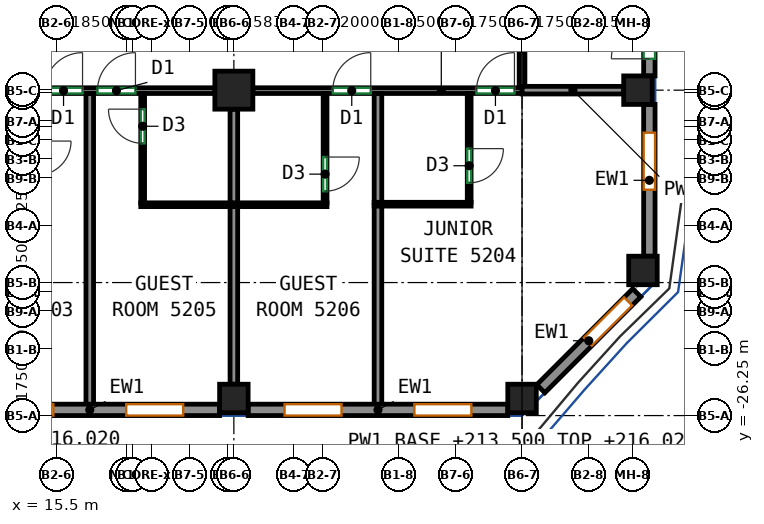
"""IFC4 building model, lengths in metres.
Left out: names, types, materials, properties, quantities, classifications, styles, units other than length and angle.
Written with IfcOpenShell. Run it as: python <this file> out.ifc"""

import sys

from ifc_helpers import new_model, si_unit, direction, frame, frame_2d, origin, origin_2d, place, context, subcontext, project, spatial, rectangle, extrude, source, transform, mapped, element, fill, save


model = new_model("IFC4")
c1 = context("Model", 3, precision=1e-05, world=origin(), true_north=direction((0.0, 1.0)))
c2 = subcontext(c1, "Body", "Model", "MODEL_VIEW")
j1 = project(units=[si_unit("LENGTHUNIT", "METRE"), si_unit("PLANEANGLEUNIT", "RADIAN")], contexts=[c1])
p1 = place(None, origin())
s1 = spatial("IfcSite", under=j1, at=p1, CompositionType="ELEMENT")
p2 = place(p1, origin())
s2 = spatial("IfcBuilding", under=s1, at=p2, CompositionType="ELEMENT")
p3 = place(p2, frame((0.0, 0.0, 213.5)))
s3 = spatial("IfcBuildingStorey", under=s2, at=p3, CompositionType="ELEMENT", Elevation=213.5)
m1 = source(origin(), c2, "Body", "SweptSolid", [
    extrude(rectangle(XDim=0.75, YDim=0.75, at=origin_2d()), origin(), (0.0, 0.0, 1.0), 3.12),
])
p4 = place(p3, frame((20.167, -25.8, 0.0), z_axis=(0.0, 0.0, 1.0), x_axis=(1.0, 0.0, 0.0)))
e1 = element("IfcColumn", 1, at=p4, inside=s3, PredefinedType="COLUMN", context=c2, shape_type="MappedRepresentation", body=[
    mapped(m1, transform((0.0, 0.0, 0.0))),
])
m2 = source(origin(), c2, "Body", "SweptSolid", [
    extrude(rectangle(XDim=1.0, YDim=1.0, at=origin_2d()), origin(), (0.0, 0.0, 1.0), 3.12),
])
p5 = place(p3, frame((20.167, -17.688, 0.0), z_axis=(0.0, 0.0, 1.0), x_axis=(1.0, 0.0, 0.0)))
e2 = element("IfcColumn", 2, at=p5, inside=s3, PredefinedType="COLUMN", context=c2, shape_type="MappedRepresentation", body=[
    mapped(m2, transform((0.0, 0.0, 0.0))),
])
for number, where, z_axis, x_axis in (
    (3, (27.75, -25.8, 0.0), (0.0, 0.0, 1.0), (1.0, 0.0, 0.0)),
    (4, (30.8, -17.688, 0.0), (0.0, 0.0, 1.0), (1.0, 0.0, 0.0)),
    (5, (30.932, -22.432, 0.0), (0.0, 0.0, 1.0), (1.0, 0.0, 0.0)),
):
    element("IfcColumn", number, at=place(p3, frame(where, z_axis=z_axis, x_axis=x_axis)), inside=s3, PredefinedType="COLUMN", context=c2, shape_type="MappedRepresentation", body=[
        mapped(m1, transform((0.0, 0.0, 0.0))),
    ])
m3 = source(origin(), c2, "Body", "SweptSolid", [
    extrude(rectangle(XDim=6.833, YDim=0.3, at=frame_2d((3.417, 0.0))), origin(), (0.0, 0.0, 1.0), 3.12),
])
p6 = place(p3, frame((12.958, -26.1, 0.0), z_axis=(0.0, 0.0, 1.0), x_axis=(1.0, 0.0, 0.0)))
e6 = element("IfcWall", 6, at=p6, inside=s3, PredefinedType="SOLIDWALL", context=c2, shape_type="MappedRepresentation", body=[
    mapped(m3, transform((0.0, 0.0, 0.0))),
])
p7 = place(p6, frame((0.958, 0.0, 0.85)))
e7 = element("IfcOpeningElement", 7, at=p7, cuts=e6, PredefinedType="OPENING", context=c2, shape_type="SweptSolid", body=[
    extrude(rectangle(XDim=1.5, YDim=1.95, at=frame_2d((0.75, 0.975))), frame((0.0, 0.16, 0.0), z_axis=(0.0, -1.0, 0.0), x_axis=(1.0, 0.0, 0.0)), (0.0, 0.0, 1.0), 0.32),
])
p8 = place(p6, frame((4.375, 0.0, 0.85)))
e8 = element("IfcOpeningElement", 8, at=p8, cuts=e6, PredefinedType="OPENING", context=c2, shape_type="SweptSolid", body=[
    extrude(rectangle(XDim=1.5, YDim=1.95, at=frame_2d((0.75, 0.975))), frame((0.0, 0.16, 0.0), z_axis=(0.0, -1.0, 0.0), x_axis=(1.0, 0.0, 0.0)), (0.0, 0.0, 1.0), 0.32),
])
m4 = source(origin(), c2, "Body", "SweptSolid", [
    extrude(rectangle(XDim=6.833, YDim=0.3, at=frame_2d((3.417, 0.0))), origin(), (0.0, 0.0, 1.0), 3.12),
])
p9 = place(p3, frame((20.542, -26.1, 0.0), z_axis=(0.0, 0.0, 1.0), x_axis=(1.0, 0.0, 0.0)))
e9 = element("IfcWall", 9, at=p9, inside=s3, PredefinedType="SOLIDWALL", context=c2, shape_type="MappedRepresentation", body=[
    mapped(m4, transform((0.0, 0.0, 0.0))),
])
p10 = place(p9, frame((0.958, 0.0, 0.85)))
e10 = element("IfcOpeningElement", 10, at=p10, cuts=e9, PredefinedType="OPENING", context=c2, shape_type="SweptSolid", body=[
    extrude(rectangle(XDim=1.5, YDim=1.95, at=frame_2d((0.75, 0.975))), frame((0.0, 0.16, 0.0), z_axis=(0.0, -1.0, 0.0), x_axis=(1.0, 0.0, 0.0)), (0.0, 0.0, 1.0), 0.32),
])
p11 = place(p9, frame((4.375, 0.0, 0.85)))
e11 = element("IfcOpeningElement", 11, at=p11, cuts=e9, PredefinedType="OPENING", context=c2, shape_type="SweptSolid", body=[
    extrude(rectangle(XDim=1.5, YDim=1.95, at=frame_2d((0.75, 0.975))), frame((0.0, 0.16, 0.0), z_axis=(0.0, -1.0, 0.0), x_axis=(1.0, 0.0, 0.0)), (0.0, 0.0, 1.0), 0.32),
])
m5 = source(origin(), c2, "Body", "SweptSolid", [
    extrude(rectangle(XDim=3.571, YDim=0.3, at=frame_2d((1.786, 0.0))), origin(), (0.0, 0.0, 1.0), 3.12),
])
p12 = place(p3, frame((28.244, -25.544, 0.0), z_axis=(0.0, 0.0, 1.0), x_axis=(0.707072595841, 0.707140964879, 0.0)))
e12 = element("IfcWall", 12, at=p12, inside=s3, PredefinedType="SOLIDWALL", context=c2, shape_type="MappedRepresentation", body=[
    mapped(m5, transform((0.0, 0.0, 0.0))),
])
p13 = place(p12, frame((1.75, 0.0, 0.85)))
e13 = element("IfcOpeningElement", 13, at=p13, cuts=e12, PredefinedType="OPENING", context=c2, shape_type="SweptSolid", body=[
    extrude(rectangle(XDim=1.5, YDim=1.95, at=frame_2d((0.75, 0.975))), frame((0.0, 0.16, 0.0), z_axis=(0.0, -1.0, 0.0), x_axis=(1.0, 0.0, 0.0)), (0.0, 0.0, 1.0), 0.32),
])
m6 = source(origin(), c2, "Body", "SweptSolid", [
    extrude(rectangle(XDim=3.994, YDim=0.3, at=frame_2d((1.997, 0.0))), origin(), (0.0, 0.0, 1.0), 3.12),
])
p14 = place(p3, frame((31.1, -22.057, 0.0), z_axis=(0.0, 0.0, 1.0), x_axis=(0.0, 1.0, 0.0)))
e14 = element("IfcWall", 14, at=p14, inside=s3, PredefinedType="SOLIDWALL", context=c2, shape_type="MappedRepresentation", body=[
    mapped(m6, transform((0.0, 0.0, 0.0))),
])
p15 = place(p14, frame((1.75, 0.0, 0.85)))
e15 = element("IfcOpeningElement", 15, at=p15, cuts=e14, PredefinedType="OPENING", context=c2, shape_type="SweptSolid", body=[
    extrude(rectangle(XDim=1.5, YDim=1.95, at=frame_2d((0.75, 0.975))), frame((0.0, 0.16, 0.0), z_axis=(0.0, -1.0, 0.0), x_axis=(1.0, 0.0, 0.0)), (0.0, 0.0, 1.0), 0.32),
])
m7 = source(origin(), c2, "Body", "SweptSolid", [
    extrude(rectangle(XDim=7.812, YDim=0.3, at=frame_2d((3.906, 0.0))), origin(), (0.0, 0.0, 1.0), 3.12),
])
p16 = place(p3, frame((31.1, -17.312, 0.0), z_axis=(0.0, 0.0, 1.0), x_axis=(0.0, 1.0, 0.0)))
e16 = element("IfcWall", 16, at=p16, inside=s3, PredefinedType="SOLIDWALL", context=c2, shape_type="MappedRepresentation", body=[
    mapped(m7, transform((0.0, 0.0, 0.0))),
])
p17 = place(p16, frame((1.75, 0.0, 0.85)))
e17 = element("IfcOpeningElement", 17, at=p17, cuts=e16, PredefinedType="OPENING", context=c2, shape_type="SweptSolid", body=[
    extrude(rectangle(XDim=1.5, YDim=1.95, at=frame_2d((0.75, 0.975))), frame((0.0, 0.16, 0.0), z_axis=(0.0, -1.0, 0.0), x_axis=(1.0, 0.0, 0.0)), (0.0, 0.0, 1.0), 0.32),
])
p18 = place(p16, frame((0.45, 0.0, 0.0)))
e18 = element("IfcOpeningElement", 18, at=p18, cuts=e16, PredefinedType="OPENING", context=c2, shape_type="SweptSolid", body=[
    extrude(rectangle(XDim=1.0, YDim=2.1, at=frame_2d((0.5, 1.05))), frame((0.0, 0.16, 0.0), z_axis=(0.0, -1.0, 0.0), x_axis=(1.0, 0.0, 0.0)), (0.0, 0.0, 1.0), 0.32),
])
p19 = place(p16, frame((5.656, 0.0, 0.85)))
e19 = element("IfcOpeningElement", 19, at=p19, cuts=e16, PredefinedType="OPENING", context=c2, shape_type="SweptSolid", body=[
    extrude(rectangle(XDim=1.5, YDim=1.95, at=frame_2d((0.75, 0.975))), frame((0.0, 0.16, 0.0), z_axis=(0.0, -1.0, 0.0), x_axis=(1.0, 0.0, 0.0)), (0.0, 0.0, 1.0), 0.32),
])
p20 = place(p16, frame((4.356, 0.0, 0.0)))
e20 = element("IfcOpeningElement", 20, at=p20, cuts=e16, PredefinedType="OPENING", context=c2, shape_type="SweptSolid", body=[
    extrude(rectangle(XDim=1.0, YDim=2.1, at=frame_2d((0.5, 1.05))), frame((0.0, 0.16, 0.0), z_axis=(0.0, -1.0, 0.0), x_axis=(1.0, 0.0, 0.0)), (0.0, 0.0, 1.0), 0.32),
])
p21 = place(p3, frame((13.083, -17.7, 0.0), z_axis=(0.0, 0.0, 1.0), x_axis=(1.0, 0.0, 0.0)))
e21 = element("IfcWall", 21, at=p21, inside=s3, PredefinedType="PARTITIONING", context=c2, shape_type="SweptSolid", body=[
    extrude(rectangle(XDim=6.584, YDim=0.15, at=frame_2d((3.292, 0.0))), origin(), (0.0, 0.0, 1.0), 3.12),
])
p22 = place(p21, frame((2.102, 0.0, 0.0)))
e22 = element("IfcOpeningElement", 22, at=p22, cuts=e21, PredefinedType="OPENING", context=c2, shape_type="SweptSolid", body=[
    extrude(rectangle(XDim=1.0, YDim=2.1, at=frame_2d((0.5, 1.05))), frame((0.0, 0.085, 0.0), z_axis=(0.0, -1.0, 0.0), x_axis=(1.0, 0.0, 0.0)), (0.0, 0.0, 1.0), 0.17),
])
p23 = place(p21, frame((3.494, 0.0, 0.0)))
e23 = element("IfcOpeningElement", 23, at=p23, cuts=e21, PredefinedType="OPENING", context=c2, shape_type="SweptSolid", body=[
    extrude(rectangle(XDim=1.0, YDim=2.1, at=frame_2d((0.5, 1.05))), frame((0.0, 0.085, 0.0), z_axis=(0.0, -1.0, 0.0), x_axis=(1.0, 0.0, 0.0)), (0.0, 0.0, 1.0), 0.17),
])
p24 = place(p3, frame((20.667, -17.7, 0.0), z_axis=(0.0, 0.0, 1.0), x_axis=(1.0, 0.0, 0.0)))
e24 = element("IfcWall", 24, at=p24, inside=s3, PredefinedType="PARTITIONING", context=c2, shape_type="SweptSolid", body=[
    extrude(rectangle(XDim=7.083, YDim=0.15, at=frame_2d((3.542, 0.0))), origin(), (0.0, 0.0, 1.0), 2.52),
])
p25 = place(p24, frame((2.102, 0.0, 0.0)))
e25 = element("IfcOpeningElement", 25, at=p25, cuts=e24, PredefinedType="OPENING", context=c2, shape_type="SweptSolid", body=[
    extrude(rectangle(XDim=1.0, YDim=2.1, at=frame_2d((0.5, 1.05))), frame((0.0, 0.085, 0.0), z_axis=(0.0, -1.0, 0.0), x_axis=(1.0, 0.0, 0.0)), (0.0, 0.0, 1.0), 0.17),
])
p26 = place(p24, frame((5.883, 0.0, 0.0)))
e26 = element("IfcOpeningElement", 26, at=p26, cuts=e24, PredefinedType="OPENING", context=c2, shape_type="SweptSolid", body=[
    extrude(rectangle(XDim=1.0, YDim=2.1, at=frame_2d((0.5, 1.05))), frame((0.0, 0.085, 0.0), z_axis=(0.0, -1.0, 0.0), x_axis=(1.0, 0.0, 0.0)), (0.0, 0.0, 1.0), 0.17),
])
p27 = place(p3, frame((27.75, -17.598, 0.0), z_axis=(0.0, 0.0, 1.0), x_axis=(0.0, 1.0, 0.0)))
e27 = element("IfcWall", 27, at=p27, inside=s3, PredefinedType="PARTITIONING", context=c2, shape_type="SweptSolid", body=[
    extrude(rectangle(XDim=2.023, YDim=0.15, at=frame_2d((1.011, 0.0))), origin(), (0.0, 0.0, 1.0), 2.52),
])
p28 = place(p3, frame((16.375, -26.0, 0.0), z_axis=(0.0, 0.0, 1.0), x_axis=(0.0, 1.0, 0.0)))
e28 = element("IfcWall", 28, at=p28, inside=s3, PredefinedType="PARTITIONING", context=c2, shape_type="SweptSolid", body=[
    extrude(rectangle(XDim=8.223, YDim=0.2, at=frame_2d((4.111, 0.0))), origin(), (0.0, 0.0, 1.0), 3.12),
])
p29 = place(p3, frame((17.767, -20.652, 0.0), z_axis=(0.0, 0.0, 1.0), x_axis=(0.0, 1.0, 0.0)))
e29 = element("IfcWall", 29, at=p29, inside=s3, PredefinedType="PARTITIONING", context=c2, shape_type="SweptSolid", body=[
    extrude(rectangle(XDim=2.875, YDim=0.1, at=frame_2d((1.438, 0.0))), origin(), (0.0, 0.0, 1.0), 3.12),
])
p30 = place(p29, frame((1.565, 0.0, 0.0)))
e30 = element("IfcOpeningElement", 30, at=p30, cuts=e29, PredefinedType="OPENING", context=c2, shape_type="SweptSolid", body=[
    extrude(rectangle(XDim=0.9, YDim=2.1, at=frame_2d((0.45, 1.05))), frame((0.0, 0.06, 0.0), z_axis=(0.0, -1.0, 0.0), x_axis=(1.0, 0.0, 0.0)), (0.0, 0.0, 1.0), 0.12),
])
p31 = place(p3, frame((17.717, -20.702, 0.0), z_axis=(0.0, 0.0, 1.0), x_axis=(1.0, 0.0, 0.0)))
e31 = element("IfcWall", 31, at=p31, inside=s3, PredefinedType="PARTITIONING", context=c2, shape_type="SweptSolid", body=[
    extrude(rectangle(XDim=4.9, YDim=0.1, at=frame_2d((2.45, 0.0))), origin(), (0.0, 0.0, 1.0), 3.12),
])
p32 = place(p3, frame((20.167, -25.425, 0.0), z_axis=(0.0, 0.0, 1.0), x_axis=(0.0, 1.0, 0.0)))
e32 = element("IfcWall", 32, at=p32, inside=s3, PredefinedType="PARTITIONING", context=c2, shape_type="SweptSolid", body=[
    extrude(rectangle(XDim=4.673, YDim=0.2, at=frame_2d((2.336, 0.0))), origin(), (0.0, 0.0, 1.0), 3.12),
])
p33 = place(p3, frame((20.167, -20.652, 0.0), z_axis=(0.0, 0.0, 1.0), x_axis=(0.0, 1.0, 0.0)))
e33 = element("IfcWall", 33, at=p33, inside=s3, PredefinedType="PARTITIONING", context=c2, shape_type="SweptSolid", body=[
    extrude(rectangle(XDim=2.464, YDim=0.2, at=frame_2d((1.232, 0.0))), origin(), (0.0, 0.0, 1.0), 3.12),
])
p34 = place(p3, frame((22.567, -17.777, 0.0), z_axis=(0.0, 0.0, 1.0), x_axis=(0.0, -1.0, 0.0)))
e34 = element("IfcWall", 34, at=p34, inside=s3, PredefinedType="PARTITIONING", context=c2, shape_type="SweptSolid", body=[
    extrude(rectangle(XDim=2.875, YDim=0.1, at=frame_2d((1.438, 0.0))), origin(), (0.0, 0.0, 1.0), 3.12),
])
p35 = place(p34, frame((1.67, 0.0, 0.0)))
e35 = element("IfcOpeningElement", 35, at=p35, cuts=e34, PredefinedType="OPENING", context=c2, shape_type="SweptSolid", body=[
    extrude(rectangle(XDim=0.9, YDim=2.1, at=frame_2d((0.45, 1.05))), frame((0.0, 0.06, 0.0), z_axis=(0.0, -1.0, 0.0), x_axis=(1.0, 0.0, 0.0)), (0.0, 0.0, 1.0), 0.12),
])
p36 = place(p3, frame((23.959, -26.0, 0.0), z_axis=(0.0, 0.0, 1.0), x_axis=(0.0, 1.0, 0.0)))
e36 = element("IfcWall", 36, at=p36, inside=s3, PredefinedType="PARTITIONING", context=c2, shape_type="SweptSolid", body=[
    extrude(rectangle(XDim=5.272, YDim=0.2, at=frame_2d((2.636, 0.0))), origin(), (0.0, 0.0, 1.0), 3.12),
])
p37 = place(p3, frame((23.959, -20.648, 0.0), z_axis=(0.0, 0.0, 1.0), x_axis=(0.0, 1.0, 0.0)))
e37 = element("IfcWall", 37, at=p37, inside=s3, PredefinedType="PARTITIONING", context=c2, shape_type="SweptSolid", body=[
    extrude(rectangle(XDim=2.871, YDim=0.2, at=frame_2d((1.436, 0.0))), origin(), (0.0, 0.0, 1.0), 3.12),
])
p38 = place(p3, frame((23.859, -20.688, 0.0), z_axis=(0.0, 0.0, 1.0), x_axis=(1.0, 0.0, 0.0)))
e38 = element("IfcWall", 38, at=p38, inside=s3, PredefinedType="PARTITIONING", context=c2, shape_type="SweptSolid", body=[
    extrude(rectangle(XDim=2.55, YDim=0.1, at=frame_2d((1.275, 0.0))), origin(), (0.0, 0.0, 1.0), 3.12),
])
p39 = place(p3, frame((26.359, -17.777, 0.0), z_axis=(0.0, 0.0, 1.0), x_axis=(0.0, -1.0, 0.0)))
e39 = element("IfcWall", 39, at=p39, inside=s3, PredefinedType="PARTITIONING", context=c2, shape_type="SweptSolid", body=[
    extrude(rectangle(XDim=2.861, YDim=0.1, at=frame_2d((1.43, 0.0))), origin(), (0.0, 0.0, 1.0), 3.12),
])
p40 = place(p39, frame((1.449, 0.0, 0.0)))
e40 = element("IfcOpeningElement", 40, at=p40, cuts=e39, PredefinedType="OPENING", context=c2, shape_type="SweptSolid", body=[
    extrude(rectangle(XDim=0.9, YDim=2.1, at=frame_2d((0.45, 1.05))), frame((0.0, 0.06, 0.0), z_axis=(0.0, -1.0, 0.0), x_axis=(1.0, 0.0, 0.0)), (0.0, 0.0, 1.0), 0.12),
])
p41 = place(p3, frame((27.752, -17.688, 0.0), z_axis=(0.0, 0.0, 1.0), x_axis=(1.0, 0.0, 0.0)))
e41 = element("IfcWall", 41, at=p41, inside=s3, PredefinedType="PARTITIONING", context=c2, shape_type="SweptSolid", body=[
    extrude(rectangle(XDim=2.673, YDim=0.2, at=frame_2d((1.336, 0.0))), origin(), (0.0, 0.0, 1.0), 2.52),
])
p42 = place(p7, origin())
e42 = element("IfcWindow", 42, at=p42, inside=s3, PartitioningType="SINGLE_PANEL", PredefinedType="WINDOW", context=c2, shape_type="SweptSolid", body=[
    extrude(rectangle(XDim=1.5, YDim=1.95, at=frame_2d((0.75, 0.975))), frame((0.0, 0.03, 0.0), z_axis=(0.0, -1.0, 0.0), x_axis=(1.0, 0.0, 0.0)), (0.0, 0.0, 1.0), 0.06),
])
fill(e7, e42)
p43 = place(p8, origin())
e43 = element("IfcWindow", 43, at=p43, inside=s3, PartitioningType="SINGLE_PANEL", PredefinedType="WINDOW", context=c2, shape_type="SweptSolid", body=[
    extrude(rectangle(XDim=1.5, YDim=1.95, at=frame_2d((0.75, 0.975))), frame((0.0, 0.03, 0.0), z_axis=(0.0, -1.0, 0.0), x_axis=(1.0, 0.0, 0.0)), (0.0, 0.0, 1.0), 0.06),
])
fill(e8, e43)
p44 = place(p10, origin())
e44 = element("IfcWindow", 44, at=p44, inside=s3, PartitioningType="SINGLE_PANEL", PredefinedType="WINDOW", context=c2, shape_type="SweptSolid", body=[
    extrude(rectangle(XDim=1.5, YDim=1.95, at=frame_2d((0.75, 0.975))), frame((0.0, 0.03, 0.0), z_axis=(0.0, -1.0, 0.0), x_axis=(1.0, 0.0, 0.0)), (0.0, 0.0, 1.0), 0.06),
])
fill(e10, e44)
p45 = place(p11, origin())
e45 = element("IfcWindow", 45, at=p45, inside=s3, PartitioningType="SINGLE_PANEL", PredefinedType="WINDOW", context=c2, shape_type="SweptSolid", body=[
    extrude(rectangle(XDim=1.5, YDim=1.95, at=frame_2d((0.75, 0.975))), frame((0.0, 0.03, 0.0), z_axis=(0.0, -1.0, 0.0), x_axis=(1.0, 0.0, 0.0)), (0.0, 0.0, 1.0), 0.06),
])
fill(e11, e45)
p46 = place(p13, origin())
e46 = element("IfcWindow", 46, at=p46, inside=s3, PartitioningType="SINGLE_PANEL", PredefinedType="WINDOW", context=c2, shape_type="SweptSolid", body=[
    extrude(rectangle(XDim=1.5, YDim=1.95, at=frame_2d((0.75, 0.975))), frame((0.0, 0.03, 0.0), z_axis=(0.0, -1.0, 0.0), x_axis=(1.0, 0.0, 0.0)), (0.0, 0.0, 1.0), 0.06),
])
fill(e13, e46)
p47 = place(p15, origin())
e47 = element("IfcWindow", 47, at=p47, inside=s3, PartitioningType="SINGLE_PANEL", PredefinedType="WINDOW", context=c2, shape_type="SweptSolid", body=[
    extrude(rectangle(XDim=1.5, YDim=1.95, at=frame_2d((0.75, 0.975))), frame((0.0, 0.03, 0.0), z_axis=(0.0, -1.0, 0.0), x_axis=(1.0, 0.0, 0.0)), (0.0, 0.0, 1.0), 0.06),
])
fill(e15, e47)
p48 = place(p18, origin())
e48 = element("IfcDoor", 48, at=p48, inside=s3, OperationType="SINGLE_SWING_LEFT", PredefinedType="DOOR", context=c2, shape_type="SweptSolid", body=[
    extrude(rectangle(XDim=1.0, YDim=2.1, at=frame_2d((0.5, 1.05))), frame((0.0, 0.025, 0.0), z_axis=(0.0, -1.0, 0.0), x_axis=(1.0, 0.0, 0.0)), (0.0, 0.0, 1.0), 0.05),
])
fill(e18, e48)
p49 = place(p35, origin())
e49 = element("IfcDoor", 49, at=p49, inside=s3, OperationType="SINGLE_SWING_LEFT", PredefinedType="DOOR", context=c2, shape_type="SweptSolid", body=[
    extrude(rectangle(XDim=0.9, YDim=2.1, at=frame_2d((0.45, 1.05))), frame((0.0, 0.025, 0.0), z_axis=(0.0, -1.0, 0.0), x_axis=(1.0, 0.0, 0.0)), (0.0, 0.0, 1.0), 0.05),
])
fill(e35, e49)
p50 = place(p40, origin())
e50 = element("IfcDoor", 50, at=p50, inside=s3, OperationType="SINGLE_SWING_LEFT", PredefinedType="DOOR", context=c2, shape_type="SweptSolid", body=[
    extrude(rectangle(XDim=0.9, YDim=2.1, at=frame_2d((0.45, 1.05))), frame((0.0, 0.025, 0.0), z_axis=(0.0, -1.0, 0.0), x_axis=(1.0, 0.0, 0.0)), (0.0, 0.0, 1.0), 0.05),
])
fill(e40, e50)
p51 = place(p30, origin())
e51 = element("IfcDoor", 51, at=p51, inside=s3, OperationType="SINGLE_SWING_RIGHT", PredefinedType="DOOR", context=c2, shape_type="SweptSolid", body=[
    extrude(rectangle(XDim=0.9, YDim=2.1, at=frame_2d((0.45, 1.05))), frame((0.0, 0.025, 0.0), z_axis=(0.0, -1.0, 0.0), x_axis=(1.0, 0.0, 0.0)), (0.0, 0.0, 1.0), 0.05),
])
fill(e30, e51)
p52 = place(p22, origin())
e52 = element("IfcDoor", 52, at=p52, inside=s3, OperationType="SINGLE_SWING_RIGHT", PredefinedType="DOOR", context=c2, shape_type="SweptSolid", body=[
    extrude(rectangle(XDim=1.0, YDim=2.1, at=frame_2d((0.5, 1.05))), frame((0.0, 0.025, 0.0), z_axis=(0.0, -1.0, 0.0), x_axis=(1.0, 0.0, 0.0)), (0.0, 0.0, 1.0), 0.05),
])
fill(e22, e52)
p53 = place(p23, origin())
e53 = element("IfcDoor", 53, at=p53, inside=s3, OperationType="SINGLE_SWING_RIGHT", PredefinedType="DOOR", context=c2, shape_type="SweptSolid", body=[
    extrude(rectangle(XDim=1.0, YDim=2.1, at=frame_2d((0.5, 1.05))), frame((0.0, 0.025, 0.0), z_axis=(0.0, -1.0, 0.0), x_axis=(1.0, 0.0, 0.0)), (0.0, 0.0, 1.0), 0.05),
])
fill(e23, e53)
p54 = place(p25, origin())
e54 = element("IfcDoor", 54, at=p54, inside=s3, OperationType="SINGLE_SWING_RIGHT", PredefinedType="DOOR", context=c2, shape_type="SweptSolid", body=[
    extrude(rectangle(XDim=1.0, YDim=2.1, at=frame_2d((0.5, 1.05))), frame((0.0, 0.025, 0.0), z_axis=(0.0, -1.0, 0.0), x_axis=(1.0, 0.0, 0.0)), (0.0, 0.0, 1.0), 0.05),
])
fill(e25, e54)
p55 = place(p26, origin())
e55 = element("IfcDoor", 55, at=p55, inside=s3, OperationType="SINGLE_SWING_RIGHT", PredefinedType="DOOR", context=c2, shape_type="SweptSolid", body=[
    extrude(rectangle(XDim=1.0, YDim=2.1, at=frame_2d((0.5, 1.05))), frame((0.0, 0.025, 0.0), z_axis=(0.0, -1.0, 0.0), x_axis=(1.0, 0.0, 0.0)), (0.0, 0.0, 1.0), 0.05),
])
fill(e26, e55)
save(model, sys.argv[1])
